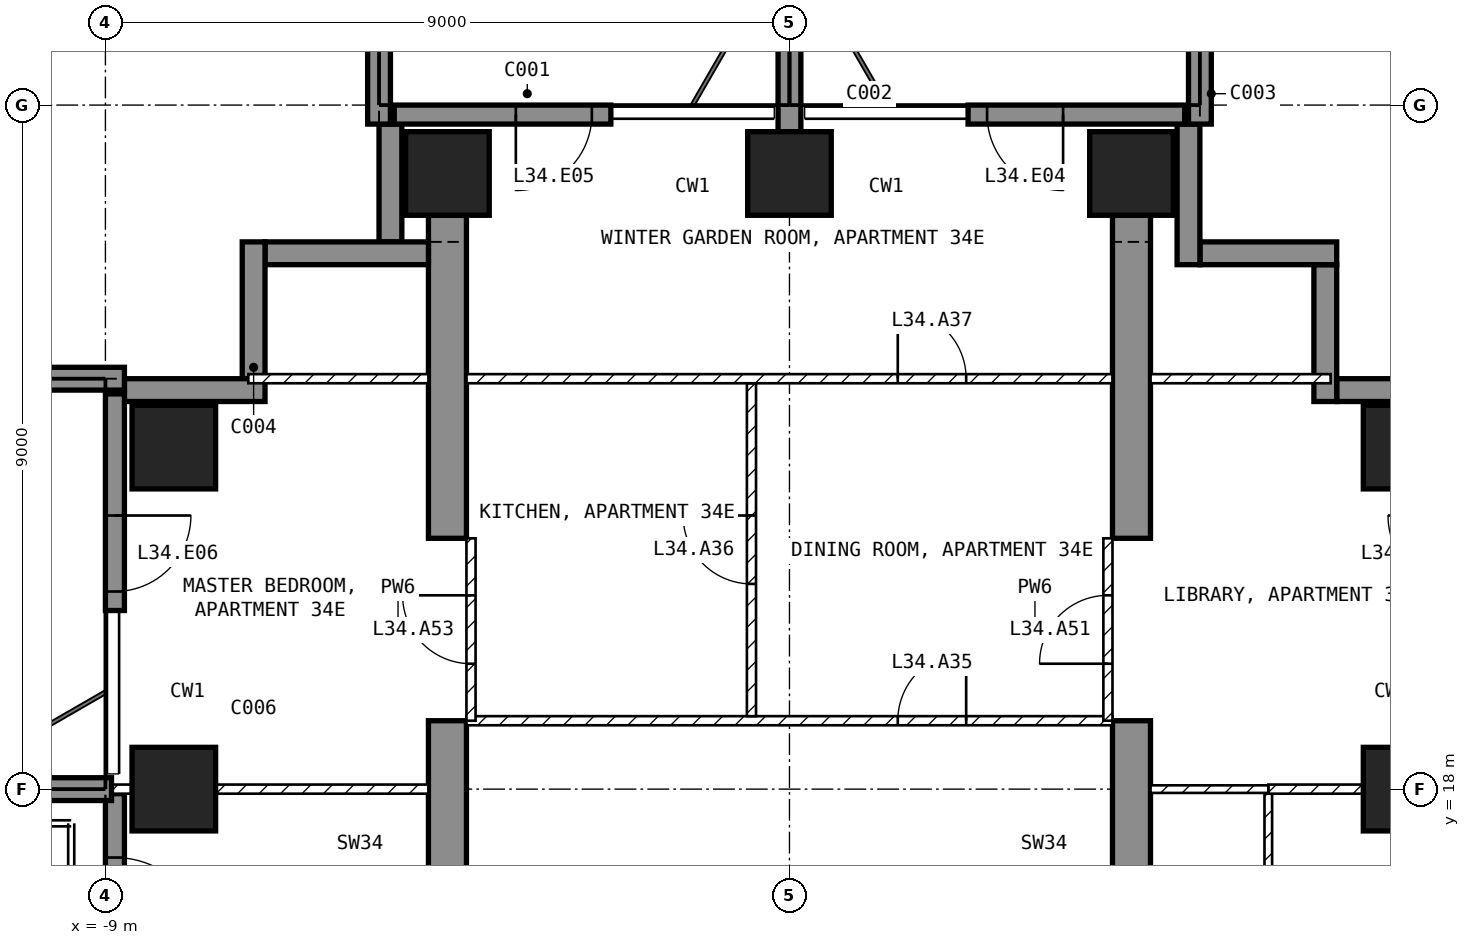
"""IFC4 building model, lengths in metres.
Left out: names, types, materials, properties, quantities, classifications, styles, units other than length and angle.
Written with IfcOpenShell. Run it as: python <this file> out.ifc"""

import sys

from ifc_helpers import new_model, si_unit, direction, frame, frame_2d, origin, origin_2d, place, context, subcontext, project, spatial, polyline, rectangle, outline, extrude, element, fill, save


model = new_model("IFC4")
c1 = context("Model", 3, precision=1e-05, world=origin(), true_north=direction((0.0, 1.0)))
c2 = subcontext(c1, "Body", "Model", "MODEL_VIEW")
j1 = project(units=[si_unit("LENGTHUNIT", "METRE"), si_unit("PLANEANGLEUNIT", "RADIAN")], contexts=[c1])
p1 = place(None, origin())
s1 = spatial("IfcSite", under=j1, at=p1, CompositionType="ELEMENT")
p2 = place(p1, origin())
s2 = spatial("IfcBuilding", under=s1, at=p2, CompositionType="ELEMENT")
p3 = place(p2, frame((0.0, 0.0, 140.9)))
s3 = spatial("IfcBuildingStorey", under=s2, at=p3, CompositionType="ELEMENT", Elevation=140.9)
for number, where, z_axis, x_axis in (
    (1, (-8.1, 18.0, -0.25), (0.0, 0.0, 1.0), (1.0, 0.0, 0.0)),
    (2, (-8.1, 22.5, -0.25), (0.0, 0.0, 1.0), (1.0, 0.0, 0.0)),
    (3, (-4.5, 26.1, -0.25), (0.0, 0.0, 1.0), (1.0, 0.0, 0.0)),
    (4, (0.0, 26.1, -0.25), (0.0, 0.0, 1.0), (1.0, 0.0, 0.0)),
    (5, (4.5, 26.1, -0.25), (0.0, 0.0, 1.0), (1.0, 0.0, 0.0)),
    (6, (8.1, 18.0, -0.25), (0.0, 0.0, 1.0), (1.0, 0.0, 0.0)),
    (7, (8.1, 22.5, -0.25), (0.0, 0.0, 1.0), (1.0, 0.0, 0.0)),
):
    element("IfcColumn", number, at=place(p3, frame(where, z_axis=z_axis, x_axis=x_axis)), inside=s3, PredefinedType="COLUMN", context=c2, shape_type="SweptSolid", body=[
        extrude(rectangle(XDim=1.1, YDim=1.1, at=origin_2d()), origin(), (0.0, 0.0, 1.0), 3.5),
    ])
for number, where, z_axis, x_axis in (
    (8, (-4.75, 9.0, -0.25), (1.0, 0.0, 0.0), (0.0, 1.0, 0.0)),
    (9, (4.25, 9.0, -0.25), (1.0, 0.0, 0.0), (0.0, 1.0, 0.0)),
):
    element("IfcWall", number, at=place(p3, frame(where, z_axis=z_axis, x_axis=x_axis)), inside=s3, PredefinedType="SHEAR", context=c2, shape_type="SweptSolid", body=[
        extrude(outline(polyline([(0.0, 0.0), (2.1, 0.0), (2.1, 2.65), (4.5, 2.65), (4.5, 0.0), (9.9, 0.0), (9.9, 2.65), (12.3, 2.65), (12.3, 0.0), (16.55, 0.0), (16.55, 3.5), (0.0, 3.5), (0.0, 0.0)])), origin(), (0.0, 0.0, 1.0), 0.5),
    ])
p4 = place(p3, frame((5.2, 26.875, 0.0), z_axis=(0.0, 0.0, 1.0), x_axis=(-1.0, 0.0, 0.0)))
e10 = element("IfcWall", 10, at=p4, inside=s3, PredefinedType="SOLIDWALL", context=c2, shape_type="SweptSolid", body=[
    extrude(rectangle(XDim=2.85, YDim=0.25, at=frame_2d((1.425, 0.0))), origin(), (0.0, 0.0, 1.0), 3.25),
])
p5 = place(p4, frame((1.6, 0.0, 0.0)))
e11 = element("IfcOpeningElement", 11, at=p5, cuts=e10, PredefinedType="OPENING", context=c2, shape_type="SweptSolid", body=[
    extrude(rectangle(XDim=1.0, YDim=2.4, at=frame_2d((0.5, 1.2))), frame((0.0, 0.135, 0.0), z_axis=(0.0, -1.0, 0.0), x_axis=(1.0, 0.0, 0.0)), (0.0, 0.0, 1.0), 0.27),
])
p6 = place(p3, frame((-2.35, 26.875, 0.0), z_axis=(0.0, 0.0, 1.0), x_axis=(-1.0, 0.0, 0.0)))
e12 = element("IfcWall", 12, at=p6, inside=s3, PredefinedType="SOLIDWALL", context=c2, shape_type="SweptSolid", body=[
    extrude(rectangle(XDim=2.85, YDim=0.25, at=frame_2d((1.425, 0.0))), origin(), (0.0, 0.0, 1.0), 3.25),
])
p7 = place(p6, frame((0.25, 0.0, 0.0)))
e13 = element("IfcOpeningElement", 13, at=p7, cuts=e12, PredefinedType="OPENING", context=c2, shape_type="SweptSolid", body=[
    extrude(rectangle(XDim=1.0, YDim=2.4, at=frame_2d((0.5, 1.2))), frame((0.0, 0.135, 0.0), z_axis=(0.0, -1.0, 0.0), x_axis=(1.0, 0.0, 0.0)), (0.0, 0.0, 1.0), 0.27),
])
p8 = place(p3, frame((-8.875, 23.2, 0.0), z_axis=(0.0, 0.0, 1.0), x_axis=(0.0, -1.0, 0.0)))
e14 = element("IfcWall", 14, at=p8, inside=s3, PredefinedType="SOLIDWALL", context=c2, shape_type="SweptSolid", body=[
    extrude(rectangle(XDim=2.85, YDim=0.25, at=frame_2d((1.425, 0.0))), origin(), (0.0, 0.0, 1.0), 3.25),
])
p9 = place(p8, frame((1.6, 0.0, 0.0)))
e15 = element("IfcOpeningElement", 15, at=p9, cuts=e14, PredefinedType="OPENING", context=c2, shape_type="SweptSolid", body=[
    extrude(rectangle(XDim=1.0, YDim=2.4, at=frame_2d((0.5, 1.2))), frame((0.0, 0.135, 0.0), z_axis=(0.0, -1.0, 0.0), x_axis=(1.0, 0.0, 0.0)), (0.0, 0.0, 1.0), 0.27),
])
p10 = place(p3, frame((-8.875, 17.94, 0.0), z_axis=(0.0, 0.0, 1.0), x_axis=(0.0, -1.0, 0.0)))
e16 = element("IfcWall", 16, at=p10, inside=s3, PredefinedType="SOLIDWALL", context=c2, shape_type="SweptSolid", body=[
    extrude(rectangle(XDim=2.29, YDim=0.25, at=frame_2d((1.145, 0.0))), origin(), (0.0, 0.0, 1.0), 3.25),
])
p11 = place(p10, frame((0.84, 0.0, 0.0)))
e17 = element("IfcOpeningElement", 17, at=p11, cuts=e16, PredefinedType="OPENING", context=c2, shape_type="SweptSolid", body=[
    extrude(rectangle(XDim=1.2, YDim=2.4, at=frame_2d((0.6, 1.2))), frame((0.0, 0.135, 0.0), z_axis=(0.0, -1.0, 0.0), x_axis=(1.0, 0.0, 0.0)), (0.0, 0.0, 1.0), 0.27),
])
p12 = place(p3, frame((8.75, 23.25, 0.0), z_axis=(0.0, 0.0, 1.0), x_axis=(-1.0, 0.0, 0.0)))
e18 = element("IfcWall", 18, at=p12, inside=s3, PredefinedType="SOLIDWALL", context=c2, shape_type="SweptSolid", body=[
    extrude(rectangle(XDim=1.55, YDim=0.3, at=frame_2d((0.775, 0.0))), origin(), (0.0, 0.0, 1.0), 3.25),
])
p13 = place(p3, frame((7.05, 23.1, 0.0), z_axis=(0.0, 0.0, 1.0), x_axis=(0.0, 1.0, 0.0)))
e19 = element("IfcWall", 19, at=p13, inside=s3, PredefinedType="SOLIDWALL", context=c2, shape_type="SweptSolid", body=[
    extrude(rectangle(XDim=1.8, YDim=0.3, at=frame_2d((0.9, 0.0))), origin(), (0.0, 0.0, 1.0), 3.25),
])
p14 = place(p3, frame((7.2, 25.05, 0.0), z_axis=(0.0, 0.0, 1.0), x_axis=(-1.0, 0.0, 0.0)))
e20 = element("IfcWall", 20, at=p14, inside=s3, PredefinedType="SOLIDWALL", context=c2, shape_type="SweptSolid", body=[
    extrude(rectangle(XDim=1.8, YDim=0.3, at=frame_2d((0.9, 0.0))), origin(), (0.0, 0.0, 1.0), 3.25),
])
p15 = place(p3, frame((5.25, 24.9, 0.0), z_axis=(0.0, 0.0, 1.0), x_axis=(0.0, 1.0, 0.0)))
e21 = element("IfcWall", 21, at=p15, inside=s3, PredefinedType="SOLIDWALL", context=c2, shape_type="SweptSolid", body=[
    extrude(rectangle(XDim=1.85, YDim=0.3, at=frame_2d((0.925, 0.0))), origin(), (0.0, 0.0, 1.0), 3.25),
])
p16 = place(p3, frame((-5.25, 26.75, 0.0), z_axis=(0.0, 0.0, 1.0), x_axis=(0.0, -1.0, 0.0)))
e22 = element("IfcWall", 22, at=p16, inside=s3, PredefinedType="SOLIDWALL", context=c2, shape_type="SweptSolid", body=[
    extrude(rectangle(XDim=1.55, YDim=0.3, at=frame_2d((0.775, 0.0))), origin(), (0.0, 0.0, 1.0), 3.25),
])
p17 = place(p3, frame((-4.75, 25.05, 0.0), z_axis=(0.0, 0.0, 1.0), x_axis=(-1.0, 0.0, 0.0)))
e23 = element("IfcWall", 23, at=p17, inside=s3, PredefinedType="SOLIDWALL", context=c2, shape_type="SweptSolid", body=[
    extrude(rectangle(XDim=2.15, YDim=0.3, at=frame_2d((1.075, 0.0))), origin(), (0.0, 0.0, 1.0), 3.25),
])
p18 = place(p3, frame((-7.05, 25.2, 0.0), z_axis=(0.0, 0.0, 1.0), x_axis=(0.0, -1.0, 0.0)))
e24 = element("IfcWall", 24, at=p18, inside=s3, PredefinedType="SOLIDWALL", context=c2, shape_type="SweptSolid", body=[
    extrude(rectangle(XDim=1.8, YDim=0.3, at=frame_2d((0.9, 0.0))), origin(), (0.0, 0.0, 1.0), 3.25),
])
p19 = place(p3, frame((-6.9, 23.25, 0.0), z_axis=(0.0, 0.0, 1.0), x_axis=(-1.0, 0.0, 0.0)))
e25 = element("IfcWall", 25, at=p19, inside=s3, PredefinedType="SOLIDWALL", context=c2, shape_type="SweptSolid", body=[
    extrude(rectangle(XDim=1.85, YDim=0.3, at=frame_2d((0.925, 0.0))), origin(), (0.0, 0.0, 1.0), 3.25),
])
p20 = place(p3, frame((-8.92, 18.0, 0.0), z_axis=(0.0, 0.0, 1.0), x_axis=(-1.0, 0.0, 0.0)))
e26 = element("IfcWall", 26, at=p20, inside=s3, PredefinedType="SOLIDWALL", context=c2, shape_type="SweptSolid", body=[
    extrude(rectangle(XDim=2.82, YDim=0.3, at=frame_2d((1.41, 0.0))), origin(), (0.0, 0.0, 1.0), 3.25),
])
for number, where, z_axis, x_axis in (
    (27, (-8.75, 23.4, 0.0), (0.0, 0.0, 1.0), (-1.0, 0.0, 0.0)),
    (28, (-5.4, 26.75, 0.0), (0.0, 0.0, 1.0), (0.0, 1.0, 0.0)),
):
    element("IfcWall", number, at=place(p3, frame(where, z_axis=z_axis, x_axis=x_axis)), inside=s3, PredefinedType="SOLIDWALL", context=c2, shape_type="SweptSolid", body=[
        extrude(rectangle(XDim=2.95, YDim=0.3, at=frame_2d((1.475, 0.0))), origin(), (0.0, 0.0, 1.0), 3.25),
    ])
p21 = place(p3, frame((0.0, 26.65, 0.0), z_axis=(0.0, 0.0, 1.0), x_axis=(0.0, 1.0, 0.0)))
e29 = element("IfcWall", 29, at=p21, inside=s3, PredefinedType="SOLIDWALL", context=c2, shape_type="SweptSolid", body=[
    extrude(rectangle(XDim=3.05, YDim=0.3, at=frame_2d((1.525, 0.0))), origin(), (0.0, 0.0, 1.0), 3.25),
])
p22 = place(p3, frame((5.4, 26.75, 0.0), z_axis=(0.0, 0.0, 1.0), x_axis=(0.0, 1.0, 0.0)))
e30 = element("IfcWall", 30, at=p22, inside=s3, PredefinedType="SOLIDWALL", context=c2, shape_type="SweptSolid", body=[
    extrude(rectangle(XDim=2.95, YDim=0.3, at=frame_2d((1.475, 0.0))), origin(), (0.0, 0.0, 1.0), 3.25),
])
p23 = place(p3, frame((-4.25, 18.9, 0.0), z_axis=(0.0, 0.0, 1.0), x_axis=(1.0, 0.0, 0.0)))
e31 = element("IfcWall", 31, at=p23, inside=s3, PredefinedType="PARTITIONING", context=c2, shape_type="SweptSolid", body=[
    extrude(rectangle(XDim=8.5, YDim=0.12, at=frame_2d((4.25, 0.0))), origin(), (0.0, 0.0, 1.0), 3.25),
])
p24 = place(p23, frame((5.675, 0.0, 0.0)))
e32 = element("IfcOpeningElement", 32, at=p24, cuts=e31, PredefinedType="OPENING", context=c2, shape_type="SweptSolid", body=[
    extrude(rectangle(XDim=0.9, YDim=2.1, at=frame_2d((0.45, 1.05))), frame((0.0, 0.07, 0.0), z_axis=(0.0, -1.0, 0.0), x_axis=(1.0, 0.0, 0.0)), (0.0, 0.0, 1.0), 0.14),
])
p25 = place(p3, frame((-0.5, 18.96, 0.0), z_axis=(0.0, 0.0, 1.0), x_axis=(0.0, 1.0, 0.0)))
e33 = element("IfcWall", 33, at=p25, inside=s3, PredefinedType="PARTITIONING", context=c2, shape_type="SweptSolid", body=[
    extrude(rectangle(XDim=4.38, YDim=0.12, at=frame_2d((2.19, 0.0))), origin(), (0.0, 0.0, 1.0), 3.25),
])
p26 = place(p25, frame((1.74, 0.0, 0.0)))
e34 = element("IfcOpeningElement", 34, at=p26, cuts=e33, PredefinedType="OPENING", context=c2, shape_type="SweptSolid", body=[
    extrude(rectangle(XDim=0.9, YDim=2.1, at=frame_2d((0.45, 1.05))), frame((0.0, 0.07, 0.0), z_axis=(0.0, -1.0, 0.0), x_axis=(1.0, 0.0, 0.0)), (0.0, 0.0, 1.0), 0.14),
])
p27 = place(p3, frame((-4.25, 23.4, 0.0), z_axis=(0.0, 0.0, 1.0), x_axis=(1.0, 0.0, 0.0)))
e35 = element("IfcWall", 35, at=p27, inside=s3, PredefinedType="PARTITIONING", context=c2, shape_type="SweptSolid", body=[
    extrude(rectangle(XDim=8.5, YDim=0.12, at=frame_2d((4.25, 0.0))), origin(), (0.0, 0.0, 1.0), 3.25),
])
p28 = place(p27, frame((5.675, 0.0, 0.0)))
e36 = element("IfcOpeningElement", 36, at=p28, cuts=e35, PredefinedType="OPENING", context=c2, shape_type="SweptSolid", body=[
    extrude(rectangle(XDim=0.9, YDim=2.1, at=frame_2d((0.45, 1.05))), frame((0.0, 0.07, 0.0), z_axis=(0.0, -1.0, 0.0), x_axis=(1.0, 0.0, 0.0)), (0.0, 0.0, 1.0), 0.14),
])
p29 = place(p3, frame((6.3, 14.45, 0.0), z_axis=(0.0, 0.0, 1.0), x_axis=(0.0, 1.0, 0.0)))
e37 = element("IfcWall", 37, at=p29, inside=s3, PredefinedType="PARTITIONING", context=c2, shape_type="SweptSolid", body=[
    extrude(rectangle(XDim=3.49, YDim=0.1, at=frame_2d((1.745, 0.0))), origin(), (0.0, 0.0, 1.0), 3.25),
])
p30 = place(p3, frame((6.3, 18.0, 0.0), z_axis=(0.0, 0.0, 1.0), x_axis=(1.0, 0.0, 0.0)))
e38 = element("IfcWall", 38, at=p30, inside=s3, PredefinedType="PARTITIONING", context=c2, shape_type="SweptSolid", body=[
    extrude(rectangle(XDim=2.62, YDim=0.12, at=frame_2d((1.31, 0.0))), origin(), (0.0, 0.0, 1.0), 2.414),
])
p31 = place(p3, frame((4.75, 18.0, 0.0), z_axis=(0.0, 0.0, 1.0), x_axis=(1.0, 0.0, 0.0)))
e39 = element("IfcWall", 39, at=p31, inside=s3, PredefinedType="PARTITIONING", context=c2, shape_type="SweptSolid", body=[
    extrude(rectangle(XDim=1.55, YDim=0.1, at=frame_2d((0.775, 0.0))), origin(), (0.0, 0.0, 1.0), 2.414),
])
p32 = place(p3, frame((4.75, 23.4, 0.0), z_axis=(0.0, 0.0, 1.0), x_axis=(1.0, 0.0, 0.0)))
e40 = element("IfcWall", 40, at=p32, inside=s3, PredefinedType="PARTITIONING", context=c2, shape_type="SweptSolid", body=[
    extrude(rectangle(XDim=2.37, YDim=0.12, at=frame_2d((1.185, 0.0))), origin(), (0.0, 0.0, 1.0), 3.25),
])
p33 = place(p3, frame((-8.92, 18.0, 0.0), z_axis=(0.0, 0.0, 1.0), x_axis=(1.0, 0.0, 0.0)))
e41 = element("IfcWall", 41, at=p33, inside=s3, PredefinedType="PARTITIONING", context=c2, shape_type="SweptSolid", body=[
    extrude(rectangle(XDim=4.17, YDim=0.12, at=frame_2d((2.085, 0.0))), origin(), (0.0, 0.0, 1.0), 2.414),
])
p34 = place(p3, frame((-7.12, 23.4, 0.0), z_axis=(0.0, 0.0, 1.0), x_axis=(1.0, 0.0, 0.0)))
e42 = element("IfcWall", 42, at=p34, inside=s3, PredefinedType="PARTITIONING", context=c2, shape_type="SweptSolid", body=[
    extrude(rectangle(XDim=2.37, YDim=0.12, at=frame_2d((1.185, 0.0))), origin(), (0.0, 0.0, 1.0), 3.25),
])
p35 = place(p3, frame((4.19, 18.9, 0.0), z_axis=(0.0, 0.0, 1.0), x_axis=(0.0, 1.0, 0.0)))
e43 = element("IfcWall", 43, at=p35, inside=s3, PredefinedType="PARTITIONING", context=c2, shape_type="SweptSolid", body=[
    extrude(rectangle(XDim=2.4, YDim=0.12, at=frame_2d((1.2, 0.0))), origin(), (0.0, 0.0, 1.0), 2.4),
])
p36 = place(p35, frame((0.75, 0.0, 0.0)))
e44 = element("IfcOpeningElement", 44, at=p36, cuts=e43, PredefinedType="OPENING", context=c2, shape_type="SweptSolid", body=[
    extrude(rectangle(XDim=0.9, YDim=2.1, at=frame_2d((0.45, 1.05))), frame((0.0, 0.07, 0.0), z_axis=(0.0, -1.0, 0.0), x_axis=(1.0, 0.0, 0.0)), (0.0, 0.0, 1.0), 0.14),
])
p37 = place(p3, frame((-4.19, 18.9, 0.0), z_axis=(0.0, 0.0, 1.0), x_axis=(0.0, 1.0, 0.0)))
e45 = element("IfcWall", 45, at=p37, inside=s3, PredefinedType="PARTITIONING", context=c2, shape_type="SweptSolid", body=[
    extrude(rectangle(XDim=2.4, YDim=0.12, at=frame_2d((1.2, 0.0))), origin(), (0.0, 0.0, 1.0), 2.4),
])
p38 = place(p37, frame((0.75, 0.0, 0.0)))
e46 = element("IfcOpeningElement", 46, at=p38, cuts=e45, PredefinedType="OPENING", context=c2, shape_type="SweptSolid", body=[
    extrude(rectangle(XDim=0.9, YDim=2.1, at=frame_2d((0.45, 1.05))), frame((0.0, 0.07, 0.0), z_axis=(0.0, -1.0, 0.0), x_axis=(1.0, 0.0, 0.0)), (0.0, 0.0, 1.0), 0.14),
])
p39 = place(p5, origin())
e47 = element("IfcDoor", 47, at=p39, inside=s3, OperationType="SINGLE_SWING_LEFT", PredefinedType="DOOR", context=c2, shape_type="SweptSolid", body=[
    extrude(rectangle(XDim=1.0, YDim=2.4, at=frame_2d((0.5, 1.2))), frame((0.0, 0.025, 0.0), z_axis=(0.0, -1.0, 0.0), x_axis=(1.0, 0.0, 0.0)), (0.0, 0.0, 1.0), 0.05),
])
fill(e11, e47)
p40 = place(p7, origin())
e48 = element("IfcDoor", 48, at=p40, inside=s3, OperationType="SINGLE_SWING_RIGHT", PredefinedType="DOOR", context=c2, shape_type="SweptSolid", body=[
    extrude(rectangle(XDim=1.0, YDim=2.4, at=frame_2d((0.5, 1.2))), frame((0.0, 0.025, 0.0), z_axis=(0.0, -1.0, 0.0), x_axis=(1.0, 0.0, 0.0)), (0.0, 0.0, 1.0), 0.05),
])
fill(e13, e48)
p41 = place(p9, origin())
e49 = element("IfcDoor", 49, at=p41, inside=s3, OperationType="SINGLE_SWING_LEFT", PredefinedType="DOOR", context=c2, shape_type="SweptSolid", body=[
    extrude(rectangle(XDim=1.0, YDim=2.4, at=frame_2d((0.5, 1.2))), frame((0.0, 0.025, 0.0), z_axis=(0.0, -1.0, 0.0), x_axis=(1.0, 0.0, 0.0)), (0.0, 0.0, 1.0), 0.05),
])
fill(e15, e49)
p42 = place(p11, origin())
e50 = element("IfcDoor", 50, at=p42, inside=s3, OperationType="SINGLE_SWING_RIGHT", PredefinedType="DOOR", context=c2, shape_type="SweptSolid", body=[
    extrude(rectangle(XDim=1.2, YDim=2.4, at=frame_2d((0.6, 1.2))), frame((0.0, 0.025, 0.0), z_axis=(0.0, -1.0, 0.0), x_axis=(1.0, 0.0, 0.0)), (0.0, 0.0, 1.0), 0.05),
])
fill(e17, e50)
p43 = place(p24, origin())
e51 = element("IfcDoor", 51, at=p43, inside=s3, OperationType="SINGLE_SWING_RIGHT", PredefinedType="DOOR", context=c2, shape_type="SweptSolid", body=[
    extrude(rectangle(XDim=0.9, YDim=2.1, at=frame_2d((0.45, 1.05))), frame((0.0, 0.025, 0.0), z_axis=(0.0, -1.0, 0.0), x_axis=(1.0, 0.0, 0.0)), (0.0, 0.0, 1.0), 0.05),
])
fill(e32, e51)
p44 = place(p26, origin())
e52 = element("IfcDoor", 52, at=p44, inside=s3, OperationType="SINGLE_SWING_RIGHT", PredefinedType="DOOR", context=c2, shape_type="SweptSolid", body=[
    extrude(rectangle(XDim=0.9, YDim=2.1, at=frame_2d((0.45, 1.05))), frame((0.0, 0.025, 0.0), z_axis=(0.0, -1.0, 0.0), x_axis=(1.0, 0.0, 0.0)), (0.0, 0.0, 1.0), 0.05),
])
fill(e34, e52)
p45 = place(p28, origin())
e53 = element("IfcDoor", 53, at=p45, inside=s3, OperationType="SINGLE_SWING_LEFT", PredefinedType="DOOR", context=c2, shape_type="SweptSolid", body=[
    extrude(rectangle(XDim=0.9, YDim=2.1, at=frame_2d((0.45, 1.05))), frame((0.0, 0.025, 0.0), z_axis=(0.0, -1.0, 0.0), x_axis=(1.0, 0.0, 0.0)), (0.0, 0.0, 1.0), 0.05),
])
fill(e36, e53)
p46 = place(p36, origin())
e54 = element("IfcDoor", 54, at=p46, inside=s3, OperationType="SINGLE_SWING_LEFT", PredefinedType="DOOR", context=c2, shape_type="SweptSolid", body=[
    extrude(rectangle(XDim=0.9, YDim=2.1, at=frame_2d((0.45, 1.05))), frame((0.0, 0.025, 0.0), z_axis=(0.0, -1.0, 0.0), x_axis=(1.0, 0.0, 0.0)), (0.0, 0.0, 1.0), 0.05),
])
fill(e44, e54)
p47 = place(p38, origin())
e55 = element("IfcDoor", 55, at=p47, inside=s3, OperationType="SINGLE_SWING_RIGHT", PredefinedType="DOOR", context=c2, shape_type="SweptSolid", body=[
    extrude(rectangle(XDim=0.9, YDim=2.1, at=frame_2d((0.45, 1.05))), frame((0.0, 0.025, 0.0), z_axis=(0.0, -1.0, 0.0), x_axis=(1.0, 0.0, 0.0)), (0.0, 0.0, 1.0), 0.05),
])
fill(e46, e55)
save(model, sys.argv[1])
